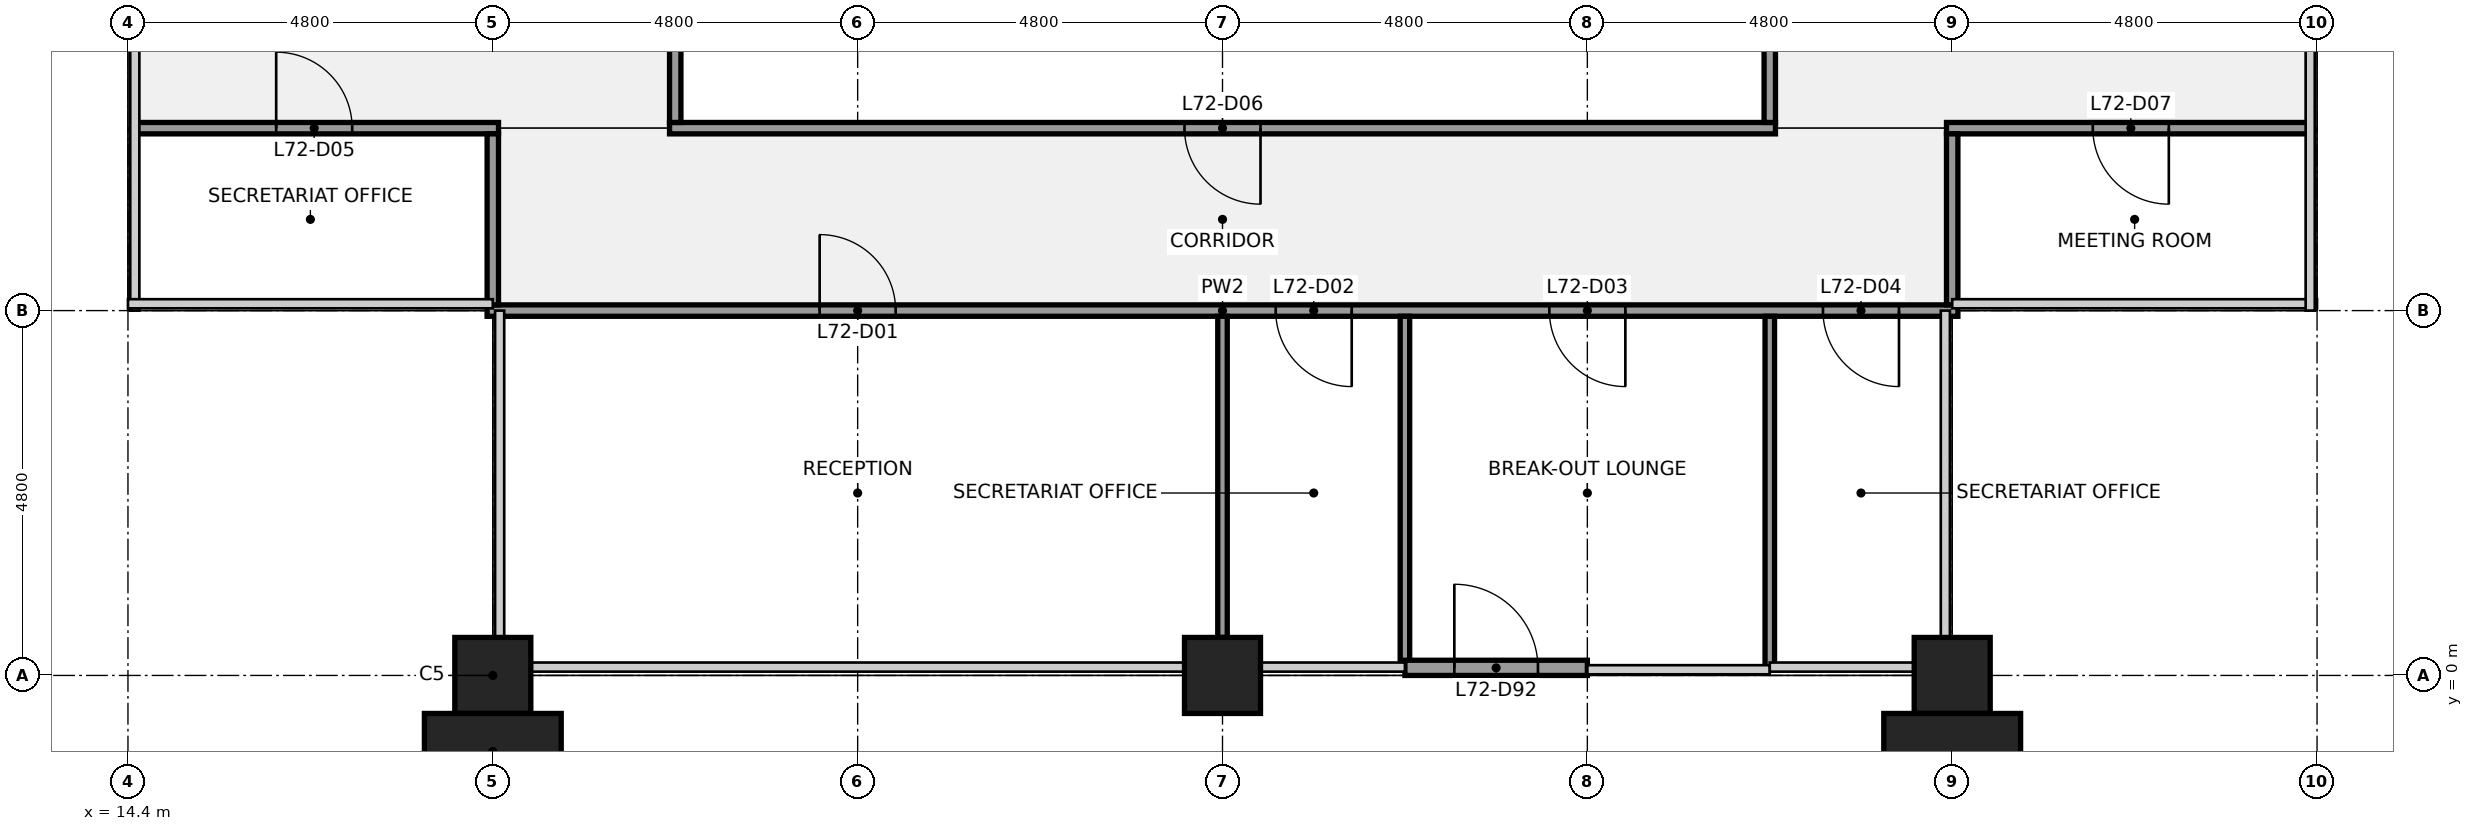
"""IFC4 building model, lengths in metres.
Left out: names, types, materials, properties, quantities, classifications, styles, units other than length and angle.
Written with IfcOpenShell. Run it as: python <this file> out.ifc"""

import sys

from ifc_helpers import new_model, si_unit, direction, frame, frame_2d, origin, origin_2d, place, context, subcontext, project, spatial, rectangle, extrude, element, fill, save


model = new_model("IFC4")
c1 = context("Model", 3, precision=1e-05, world=origin(), true_north=direction((0.0, 1.0)))
c2 = subcontext(c1, "Body", "Model", "MODEL_VIEW")
j1 = project(units=[si_unit("LENGTHUNIT", "METRE"), si_unit("PLANEANGLEUNIT", "RADIAN")], contexts=[c1])
p1 = place(None, origin())
s1 = spatial("IfcSite", under=j1, at=p1, CompositionType="ELEMENT")
p2 = place(p1, origin())
s2 = spatial("IfcBuilding", under=s1, at=p2, CompositionType="ELEMENT")
p3 = place(p2, frame((0.0, 0.0, 326.3)))
s3 = spatial("IfcBuildingStorey", under=s2, at=p3, CompositionType="ELEMENT", Elevation=326.3)
for number, where, z_axis, x_axis in (
    (1, (19.2, 0.0, 0.0), (0.0, 0.0, 1.0), (1.0, 0.0, 0.0)),
    (2, (28.8, 0.0, 0.0), (0.0, 0.0, 1.0), (1.0, 0.0, 0.0)),
    (3, (38.4, 0.0, 0.0), (0.0, 0.0, 1.0), (1.0, 0.0, 0.0)),
):
    element("IfcColumn", number, at=place(p3, frame(where, z_axis=z_axis, x_axis=x_axis)), inside=s3, PredefinedType="COLUMN", context=c2, shape_type="SweptSolid", body=[
        extrude(rectangle(XDim=1.0, YDim=1.0, at=origin_2d()), origin(), (0.0, 0.0, 1.0), 4.0),
    ])
p4 = place(p3, frame((19.125, 4.8, 0.0), z_axis=(0.0, 0.0, 1.0), x_axis=(1.0, 0.0, 0.0)))
e4 = element("IfcWall", 4, at=p4, inside=s3, PredefinedType="PARTITIONING", context=c2, shape_type="SweptSolid", body=[
    extrude(rectangle(XDim=19.35, YDim=0.15, at=frame_2d((9.675, 0.0))), origin(), (0.0, 0.0, 1.0), 2.87),
])
p5 = place(p4, frame((4.375, 0.0, 0.0)))
e5 = element("IfcOpeningElement", 5, at=p5, cuts=e4, PredefinedType="OPENING", context=c2, shape_type="SweptSolid", body=[
    extrude(rectangle(XDim=1.0, YDim=2.1, at=frame_2d((0.5, 1.05))), frame((0.0, 0.085, 0.0), z_axis=(0.0, -1.0, 0.0), x_axis=(1.0, 0.0, 0.0)), (0.0, 0.0, 1.0), 0.17),
])
p6 = place(p4, frame((10.375, 0.0, 0.0)))
e6 = element("IfcOpeningElement", 6, at=p6, cuts=e4, PredefinedType="OPENING", context=c2, shape_type="SweptSolid", body=[
    extrude(rectangle(XDim=1.0, YDim=2.1, at=frame_2d((0.5, 1.05))), frame((0.0, 0.085, 0.0), z_axis=(0.0, -1.0, 0.0), x_axis=(1.0, 0.0, 0.0)), (0.0, 0.0, 1.0), 0.17),
])
p7 = place(p4, frame((13.975, 0.0, 0.0)))
e7 = element("IfcOpeningElement", 7, at=p7, cuts=e4, PredefinedType="OPENING", context=c2, shape_type="SweptSolid", body=[
    extrude(rectangle(XDim=1.0, YDim=2.1, at=frame_2d((0.5, 1.05))), frame((0.0, 0.085, 0.0), z_axis=(0.0, -1.0, 0.0), x_axis=(1.0, 0.0, 0.0)), (0.0, 0.0, 1.0), 0.17),
])
p8 = place(p4, frame((17.575, 0.0, 0.0)))
e8 = element("IfcOpeningElement", 8, at=p8, cuts=e4, PredefinedType="OPENING", context=c2, shape_type="SweptSolid", body=[
    extrude(rectangle(XDim=1.0, YDim=2.1, at=frame_2d((0.5, 1.05))), frame((0.0, 0.085, 0.0), z_axis=(0.0, -1.0, 0.0), x_axis=(1.0, 0.0, 0.0)), (0.0, 0.0, 1.0), 0.17),
])
p9 = place(p3, frame((14.5, 7.2, 0.0), z_axis=(0.0, 0.0, 1.0), x_axis=(1.0, 0.0, 0.0)))
e9 = element("IfcWall", 9, at=p9, inside=s3, PredefinedType="PARTITIONING", context=c2, shape_type="SweptSolid", body=[
    extrude(rectangle(XDim=4.775, YDim=0.15, at=frame_2d((2.387, 0.0))), origin(), (0.0, 0.0, 1.0), 2.87),
])
p10 = place(p9, frame((1.85, 0.0, 0.0)))
e10 = element("IfcOpeningElement", 10, at=p10, cuts=e9, PredefinedType="OPENING", context=c2, shape_type="SweptSolid", body=[
    extrude(rectangle(XDim=1.0, YDim=2.1, at=frame_2d((0.5, 1.05))), frame((0.0, 0.085, 0.0), z_axis=(0.0, -1.0, 0.0), x_axis=(1.0, 0.0, 0.0)), (0.0, 0.0, 1.0), 0.17),
])
p11 = place(p3, frame((21.525, 7.2, 0.0), z_axis=(0.0, 0.0, 1.0), x_axis=(1.0, 0.0, 0.0)))
e11 = element("IfcWall", 11, at=p11, inside=s3, PredefinedType="PARTITIONING", context=c2, shape_type="SweptSolid", body=[
    extrude(rectangle(XDim=14.55, YDim=0.15, at=frame_2d((7.275, 0.0))), origin(), (0.0, 0.0, 1.0), 2.87),
])
p12 = place(p11, frame((6.775, 0.0, 0.0)))
e12 = element("IfcOpeningElement", 12, at=p12, cuts=e11, PredefinedType="OPENING", context=c2, shape_type="SweptSolid", body=[
    extrude(rectangle(XDim=1.0, YDim=2.1, at=frame_2d((0.5, 1.05))), frame((0.0, 0.085, 0.0), z_axis=(0.0, -1.0, 0.0), x_axis=(1.0, 0.0, 0.0)), (0.0, 0.0, 1.0), 0.17),
])
p13 = place(p3, frame((38.325, 7.2, 0.0), z_axis=(0.0, 0.0, 1.0), x_axis=(1.0, 0.0, 0.0)))
e13 = element("IfcWall", 13, at=p13, inside=s3, PredefinedType="PARTITIONING", context=c2, shape_type="SweptSolid", body=[
    extrude(rectangle(XDim=4.775, YDim=0.15, at=frame_2d((2.388, 0.0))), origin(), (0.0, 0.0, 1.0), 2.87),
])
p14 = place(p13, frame((1.925, 0.0, 0.0)))
e14 = element("IfcOpeningElement", 14, at=p14, cuts=e13, PredefinedType="OPENING", context=c2, shape_type="SweptSolid", body=[
    extrude(rectangle(XDim=1.0, YDim=2.1, at=frame_2d((0.5, 1.05))), frame((0.0, 0.085, 0.0), z_axis=(0.0, -1.0, 0.0), x_axis=(1.0, 0.0, 0.0)), (0.0, 0.0, 1.0), 0.17),
])
p15 = place(p3, frame((19.2, 4.875, 0.0), z_axis=(0.0, 0.0, 1.0), x_axis=(0.0, 1.0, 0.0)))
e15 = element("IfcWall", 15, at=p15, inside=s3, PredefinedType="PARTITIONING", context=c2, shape_type="SweptSolid", body=[
    extrude(rectangle(XDim=2.25, YDim=0.15, at=frame_2d((1.125, 0.0))), origin(), (0.0, 0.0, 1.0), 2.87),
])
p16 = place(p3, frame((21.6, 7.275, 0.0), z_axis=(0.0, 0.0, 1.0), x_axis=(0.0, 1.0, 0.0)))
e16 = element("IfcWall", 16, at=p16, inside=s3, PredefinedType="PARTITIONING", context=c2, shape_type="SweptSolid", body=[
    extrude(rectangle(XDim=7.062, YDim=0.15, at=frame_2d((3.531, 0.0))), origin(), (0.0, 0.0, 1.0), 2.87),
])
p17 = place(p3, frame((28.8, 0.5, 0.0), z_axis=(0.0, 0.0, 1.0), x_axis=(0.0, 1.0, 0.0)))
e17 = element("IfcWall", 17, at=p17, inside=s3, PredefinedType="PARTITIONING", context=c2, shape_type="SweptSolid", body=[
    extrude(rectangle(XDim=4.225, YDim=0.125, at=frame_2d((2.113, 0.0))), origin(), (0.0, 0.0, 1.0), 2.87),
])
for number, where, z_axis, x_axis in (
    (18, (31.2, 0.1, 0.0), (0.0, 0.0, 1.0), (0.0, 1.0, 0.0)),
    (19, (36.0, 0.1, 0.0), (0.0, 0.0, 1.0), (0.0, 1.0, 0.0)),
):
    element("IfcWall", number, at=place(p3, frame(where, z_axis=z_axis, x_axis=x_axis)), inside=s3, PredefinedType="PARTITIONING", context=c2, shape_type="SweptSolid", body=[
        extrude(rectangle(XDim=4.625, YDim=0.125, at=frame_2d((2.312, 0.0))), origin(), (0.0, 0.0, 1.0), 2.87),
    ])
p18 = place(p3, frame((36.0, 7.275, 0.0), z_axis=(0.0, 0.0, 1.0), x_axis=(0.0, 1.0, 0.0)))
e20 = element("IfcWall", 20, at=p18, inside=s3, PredefinedType="PARTITIONING", context=c2, shape_type="SweptSolid", body=[
    extrude(rectangle(XDim=7.062, YDim=0.15, at=frame_2d((3.531, 0.0))), origin(), (0.0, 0.0, 1.0), 2.87),
])
p19 = place(p3, frame((38.4, 4.875, 0.0), z_axis=(0.0, 0.0, 1.0), x_axis=(0.0, 1.0, 0.0)))
e21 = element("IfcWall", 21, at=p19, inside=s3, PredefinedType="PARTITIONING", context=c2, shape_type="SweptSolid", body=[
    extrude(rectangle(XDim=2.25, YDim=0.15, at=frame_2d((1.125, 0.0))), origin(), (0.0, 0.0, 1.0), 2.87),
])
p20 = place(p3, frame((31.2, 0.1, 0.0), z_axis=(0.0, 0.0, 1.0), x_axis=(1.0, 0.0, 0.0)))
e22 = element("IfcWall", 22, at=p20, inside=s3, PredefinedType="SOLIDWALL", context=c2, shape_type="SweptSolid", body=[
    extrude(rectangle(XDim=2.4, YDim=0.2, at=frame_2d((1.2, 0.0))), origin(), (0.0, 0.0, 1.0), 3.314),
])
p21 = place(p20, frame((0.65, 0.0, 0.0)))
e23 = element("IfcOpeningElement", 23, at=p21, cuts=e22, PredefinedType="OPENING", context=c2, shape_type="SweptSolid", body=[
    extrude(rectangle(XDim=1.1, YDim=2.1, at=frame_2d((0.55, 1.05))), frame((0.0, 0.11, 0.0), z_axis=(0.0, -1.0, 0.0), x_axis=(1.0, 0.0, 0.0)), (0.0, 0.0, 1.0), 0.22),
])
for number, where, z_axis, x_axis in (
    (24, (19.2, -1.0, 0.0), (0.0, 0.0, 1.0), (1.0, 0.0, 0.0)),
    (25, (38.4, -1.0, 0.0), (0.0, 0.0, 1.0), (1.0, 0.0, 0.0)),
):
    element("IfcColumn", number, at=place(p3, frame(where, z_axis=z_axis, x_axis=x_axis)), inside=s3, PredefinedType="PILASTER", context=c2, shape_type="SweptSolid", body=[
        extrude(rectangle(XDim=1.8, YDim=1.0, at=origin_2d()), origin(), (0.0, 0.0, 1.0), 4.0),
    ])
p22 = place(p5, origin())
e26 = element("IfcDoor", 26, at=p22, inside=s3, OperationType="SINGLE_SWING_LEFT", PredefinedType="DOOR", context=c2, shape_type="SweptSolid", body=[
    extrude(rectangle(XDim=1.0, YDim=2.1, at=frame_2d((0.5, 1.05))), frame((0.0, 0.025, 0.0), z_axis=(0.0, -1.0, 0.0), x_axis=(1.0, 0.0, 0.0)), (0.0, 0.0, 1.0), 0.05),
])
fill(e5, e26)
p23 = place(p6, origin())
e27 = element("IfcDoor", 27, at=p23, inside=s3, OperationType="SINGLE_SWING_RIGHT", PredefinedType="DOOR", context=c2, shape_type="SweptSolid", body=[
    extrude(rectangle(XDim=1.0, YDim=2.1, at=frame_2d((0.5, 1.05))), frame((0.0, 0.025, 0.0), z_axis=(0.0, -1.0, 0.0), x_axis=(1.0, 0.0, 0.0)), (0.0, 0.0, 1.0), 0.05),
])
fill(e6, e27)
p24 = place(p7, origin())
e28 = element("IfcDoor", 28, at=p24, inside=s3, OperationType="SINGLE_SWING_RIGHT", PredefinedType="DOOR", context=c2, shape_type="SweptSolid", body=[
    extrude(rectangle(XDim=1.0, YDim=2.1, at=frame_2d((0.5, 1.05))), frame((0.0, 0.025, 0.0), z_axis=(0.0, -1.0, 0.0), x_axis=(1.0, 0.0, 0.0)), (0.0, 0.0, 1.0), 0.05),
])
fill(e7, e28)
p25 = place(p8, origin())
e29 = element("IfcDoor", 29, at=p25, inside=s3, OperationType="SINGLE_SWING_RIGHT", PredefinedType="DOOR", context=c2, shape_type="SweptSolid", body=[
    extrude(rectangle(XDim=1.0, YDim=2.1, at=frame_2d((0.5, 1.05))), frame((0.0, 0.025, 0.0), z_axis=(0.0, -1.0, 0.0), x_axis=(1.0, 0.0, 0.0)), (0.0, 0.0, 1.0), 0.05),
])
fill(e8, e29)
p26 = place(p10, origin())
e30 = element("IfcDoor", 30, at=p26, inside=s3, OperationType="SINGLE_SWING_LEFT", PredefinedType="DOOR", context=c2, shape_type="SweptSolid", body=[
    extrude(rectangle(XDim=1.0, YDim=2.1, at=frame_2d((0.5, 1.05))), frame((0.0, 0.025, 0.0), z_axis=(0.0, -1.0, 0.0), x_axis=(1.0, 0.0, 0.0)), (0.0, 0.0, 1.0), 0.05),
])
fill(e10, e30)
p27 = place(p12, origin())
e31 = element("IfcDoor", 31, at=p27, inside=s3, OperationType="SINGLE_SWING_RIGHT", PredefinedType="DOOR", context=c2, shape_type="SweptSolid", body=[
    extrude(rectangle(XDim=1.0, YDim=2.1, at=frame_2d((0.5, 1.05))), frame((0.0, 0.025, 0.0), z_axis=(0.0, -1.0, 0.0), x_axis=(1.0, 0.0, 0.0)), (0.0, 0.0, 1.0), 0.05),
])
fill(e12, e31)
p28 = place(p14, origin())
e32 = element("IfcDoor", 32, at=p28, inside=s3, OperationType="SINGLE_SWING_RIGHT", PredefinedType="DOOR", context=c2, shape_type="SweptSolid", body=[
    extrude(rectangle(XDim=1.0, YDim=2.1, at=frame_2d((0.5, 1.05))), frame((0.0, 0.025, 0.0), z_axis=(0.0, -1.0, 0.0), x_axis=(1.0, 0.0, 0.0)), (0.0, 0.0, 1.0), 0.05),
])
fill(e14, e32)
p29 = place(p21, origin())
e33 = element("IfcDoor", 33, at=p29, inside=s3, OperationType="SINGLE_SWING_LEFT", PredefinedType="DOOR", context=c2, shape_type="SweptSolid", body=[
    extrude(rectangle(XDim=1.1, YDim=2.1, at=frame_2d((0.55, 1.05))), frame((0.0, 0.025, 0.0), z_axis=(0.0, -1.0, 0.0), x_axis=(1.0, 0.0, 0.0)), (0.0, 0.0, 1.0), 0.05),
])
fill(e23, e33)
save(model, sys.argv[1])
